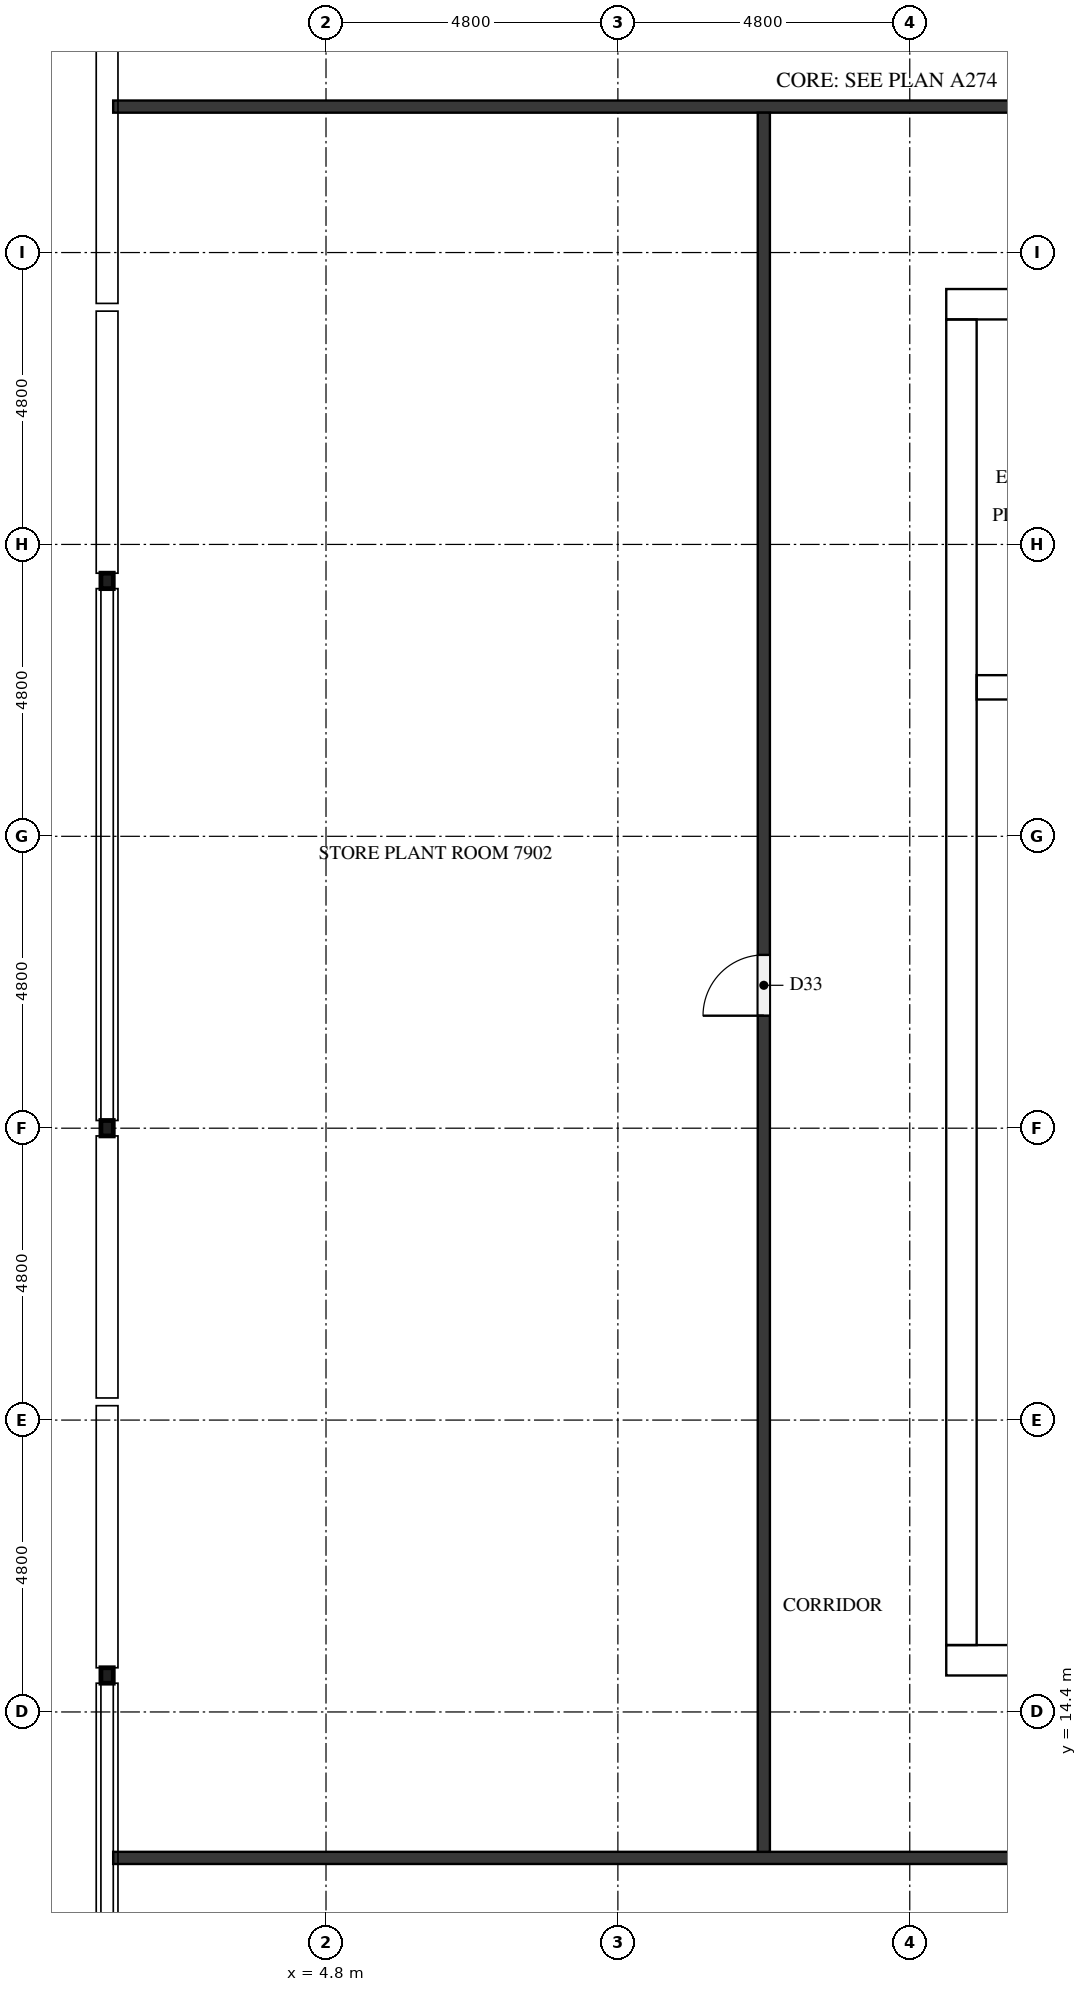
"""IFC4 building model, lengths in metres.
Left out: names, types, materials, properties, quantities, classifications, styles, units other than length and angle.
Written with IfcOpenShell. Run it as: python <this file> out.ifc"""

import sys

from ifc_helpers import new_model, si_unit, direction, frame, frame_2d, origin, origin_2d, place, context, subcontext, project, spatial, rectangle, hollow_rectangle, extrude, element, fill, save


model = new_model("IFC4")
c1 = context("Model", 3, precision=1e-05, world=origin(), true_north=direction((0.0, 1.0)))
c2 = subcontext(c1, "Body", "Model", "MODEL_VIEW")
j1 = project(units=[si_unit("LENGTHUNIT", "METRE"), si_unit("PLANEANGLEUNIT", "RADIAN")], contexts=[c1])
p1 = place(None, origin())
s1 = spatial("IfcSite", under=j1, at=p1, CompositionType="ELEMENT")
p2 = place(p1, origin())
s2 = spatial("IfcBuilding", under=s1, at=p2, CompositionType="ELEMENT")
p3 = place(p2, frame((0.0, 0.0, 305.9)))
s3 = spatial("IfcBuildingStorey", under=s2, at=p3, CompositionType="ELEMENT", Elevation=305.9)
p4 = place(p3, frame((15.0, 15.25, 0.0), z_axis=(0.0, 0.0, 1.0), x_axis=(1.0, 0.0, 0.0)))
e1 = element("IfcWall", 1, at=p4, inside=s3, PredefinedType="SHEAR", context=c2, shape_type="SweptSolid", body=[
    extrude(rectangle(XDim=32.4, YDim=0.5, at=frame_2d((16.2, 0.0))), origin(), (0.0, 0.0, 1.0), 3.8),
])
p5 = place(p4, frame((15.3, 0.0, 0.0)))
e2 = element("IfcOpeningElement", 2, at=p5, cuts=e1, PredefinedType="OPENING", context=c2, shape_type="SweptSolid", body=[
    extrude(rectangle(XDim=1.8, YDim=2.1, at=frame_2d((0.9, 1.05))), frame((0.0, 0.26, 0.0), z_axis=(0.0, -1.0, 0.0), x_axis=(1.0, 0.0, 0.0)), (0.0, 0.0, 1.0), 0.52),
])
p6 = place(p3, frame((15.0, 37.55, 0.0), z_axis=(0.0, 0.0, 1.0), x_axis=(1.0, 0.0, 0.0)))
e3 = element("IfcWall", 3, at=p6, inside=s3, PredefinedType="SHEAR", context=c2, shape_type="SweptSolid", body=[
    extrude(rectangle(XDim=32.4, YDim=0.5, at=frame_2d((16.2, 0.0))), origin(), (0.0, 0.0, 1.0), 3.8),
])
p7 = place(p6, frame((15.3, 0.0, 0.0)))
e4 = element("IfcOpeningElement", 4, at=p7, cuts=e3, PredefinedType="OPENING", context=c2, shape_type="SweptSolid", body=[
    extrude(rectangle(XDim=1.8, YDim=2.1, at=frame_2d((0.9, 1.05))), frame((0.0, 0.26, 0.0), z_axis=(0.0, -1.0, 0.0), x_axis=(1.0, 0.0, 0.0)), (0.0, 0.0, 1.0), 0.52),
])
p8 = place(p6, frame((1.282, 0.0, 0.0)))
e5 = element("IfcOpeningElement", 5, at=p8, cuts=e3, PredefinedType="OPENING", context=c2, shape_type="SweptSolid", body=[
    extrude(rectangle(XDim=1.0, YDim=2.1, at=frame_2d((0.5, 1.05))), frame((0.0, 0.26, 0.0), z_axis=(0.0, -1.0, 0.0), x_axis=(1.0, 0.0, 0.0)), (0.0, 0.0, 1.0), 0.52),
])
p9 = place(p6, frame((5.082, 0.0, 0.0)))
e6 = element("IfcOpeningElement", 6, at=p9, cuts=e3, PredefinedType="OPENING", context=c2, shape_type="SweptSolid", body=[
    extrude(rectangle(XDim=1.0, YDim=2.1, at=frame_2d((0.5, 1.05))), frame((0.0, 0.26, 0.0), z_axis=(0.0, -1.0, 0.0), x_axis=(1.0, 0.0, 0.0)), (0.0, 0.0, 1.0), 0.52),
])
p10 = place(p3, frame((15.25, 15.5, 0.0), z_axis=(0.0, 0.0, 1.0), x_axis=(0.0, 1.0, 0.0)))
e7 = element("IfcWall", 7, at=p10, inside=s3, PredefinedType="SHEAR", context=c2, shape_type="SweptSolid", body=[
    extrude(rectangle(XDim=21.8, YDim=0.5, at=frame_2d((10.9, 0.0))), origin(), (0.0, 0.0, 1.0), 3.8),
])
p11 = place(p10, frame((5.26, 0.0, 0.0)))
e8 = element("IfcOpeningElement", 8, at=p11, cuts=e7, PredefinedType="OPENING", context=c2, shape_type="SweptSolid", body=[
    extrude(rectangle(XDim=1.2, YDim=2.1, at=frame_2d((0.6, 1.05))), frame((0.0, 0.26, 0.0), z_axis=(0.0, -1.0, 0.0), x_axis=(1.0, 0.0, 0.0)), (0.0, 0.0, 1.0), 0.52),
])
p12 = place(p3, frame((15.5, 31.25, 0.0), z_axis=(0.0, 0.0, 1.0), x_axis=(1.0, 0.0, 0.0)))
e9 = element("IfcWall", 9, at=p12, inside=s3, PredefinedType="SHEAR", context=c2, shape_type="SweptSolid", body=[
    extrude(rectangle(XDim=7.4, YDim=0.4, at=frame_2d((3.7, 0.0))), origin(), (0.0, 0.0, 1.0), 3.8),
])
for number, where, z_axis, x_axis in (
    (10, (1.2, 33.0, 0.0), (0.0, 0.0, 1.0), (1.0, 0.0, 0.0)),
    (11, (1.2, 24.0, 0.0), (0.0, 0.0, 1.0), (1.0, 0.0, 0.0)),
    (12, (1.2, 15.0, 0.0), (0.0, 0.0, 1.0), (1.0, 0.0, 0.0)),
):
    element("IfcColumn", number, at=place(p3, frame(where, z_axis=z_axis, x_axis=x_axis)), inside=s3, PredefinedType="COLUMN", context=c2, shape_type="SweptSolid", body=[
        extrude(hollow_rectangle(XDim=0.203, YDim=0.254, WallThickness=0.01, InnerFilletRadius=0.004, OuterFilletRadius=0.013, at=origin_2d()), origin(), (0.0, 0.0, 1.0), 3.8),
    ])
p13 = place(p3, frame((56.3, 12.0, 0.0), z_axis=(0.0, 0.0, 1.0), x_axis=(-1.0, 0.0, 0.0)))
e13 = element("IfcWall", 13, at=p13, inside=s3, PredefinedType="PARTITIONING", context=c2, shape_type="SweptSolid", body=[
    extrude(rectangle(XDim=55.0, YDim=0.2, at=frame_2d((27.5, 0.0))), origin(), (0.0, 0.0, 1.0), 3.8),
])
p14 = place(p13, frame((24.55, 0.0, 0.0)))
e14 = element("IfcOpeningElement", 14, at=p14, cuts=e13, PredefinedType="OPENING", context=c2, shape_type="SweptSolid", body=[
    extrude(rectangle(XDim=1.0, YDim=2.1, at=frame_2d((0.5, 1.05))), frame((0.0, 0.11, 0.0), z_axis=(0.0, -1.0, 0.0), x_axis=(1.0, 0.0, 0.0)), (0.0, 0.0, 1.0), 0.22),
])
p15 = place(p3, frame((1.3, 40.8, 0.0), z_axis=(0.0, 0.0, 1.0), x_axis=(1.0, 0.0, 0.0)))
e15 = element("IfcWall", 15, at=p15, inside=s3, PredefinedType="PARTITIONING", context=c2, shape_type="SweptSolid", body=[
    extrude(rectangle(XDim=55.0, YDim=0.2, at=frame_2d((27.5, 0.0))), origin(), (0.0, 0.0, 1.0), 3.8),
])
p16 = place(p15, frame((29.35, 0.0, 0.0)))
e16 = element("IfcOpeningElement", 16, at=p16, cuts=e15, PredefinedType="OPENING", context=c2, shape_type="SweptSolid", body=[
    extrude(rectangle(XDim=1.0, YDim=2.1, at=frame_2d((0.5, 1.05))), frame((0.0, 0.11, 0.0), z_axis=(0.0, -1.0, 0.0), x_axis=(1.0, 0.0, 0.0)), (0.0, 0.0, 1.0), 0.22),
])
p17 = place(p3, frame((12.0, 12.1, 0.0), z_axis=(0.0, 0.0, 1.0), x_axis=(0.0, 1.0, 0.0)))
e17 = element("IfcWall", 17, at=p17, inside=s3, PredefinedType="PARTITIONING", context=c2, shape_type="SweptSolid", body=[
    extrude(rectangle(XDim=28.6, YDim=0.2, at=frame_2d((14.3, 0.0))), origin(), (0.0, 0.0, 1.0), 3.8),
])
p18 = place(p17, frame((13.75, 0.0, 0.0)))
e18 = element("IfcOpeningElement", 18, at=p18, cuts=e17, PredefinedType="OPENING", context=c2, shape_type="SweptSolid", body=[
    extrude(rectangle(XDim=1.0, YDim=2.1, at=frame_2d((0.5, 1.05))), frame((0.0, 0.11, 0.0), z_axis=(0.0, -1.0, 0.0), x_axis=(1.0, 0.0, 0.0)), (0.0, 0.0, 1.0), 0.22),
])
p19 = place(p11, frame((1.2, 0.0, 0.0), z_axis=(0.0, 0.0, 1.0), x_axis=(-1.0, 0.0, 0.0)))
e19 = element("IfcDoor", 19, at=p19, inside=s3, OperationType="SINGLE_SWING_RIGHT", PredefinedType="DOOR", context=c2, shape_type="SweptSolid", body=[
    extrude(rectangle(XDim=1.2, YDim=2.1, at=frame_2d((0.6, 1.05))), frame((0.0, 0.025, 0.0), z_axis=(0.0, -1.0, 0.0), x_axis=(1.0, 0.0, 0.0)), (0.0, 0.0, 1.0), 0.05),
])
fill(e8, e19)
p20 = place(p18, origin())
e20 = element("IfcDoor", 20, at=p20, inside=s3, OperationType="SINGLE_SWING_LEFT", PredefinedType="DOOR", context=c2, shape_type="SweptSolid", body=[
    extrude(rectangle(XDim=1.0, YDim=2.1, at=frame_2d((0.5, 1.05))), frame((0.0, 0.025, 0.0), z_axis=(0.0, -1.0, 0.0), x_axis=(1.0, 0.0, 0.0)), (0.0, 0.0, 1.0), 0.05),
])
fill(e18, e20)
save(model, sys.argv[1])
